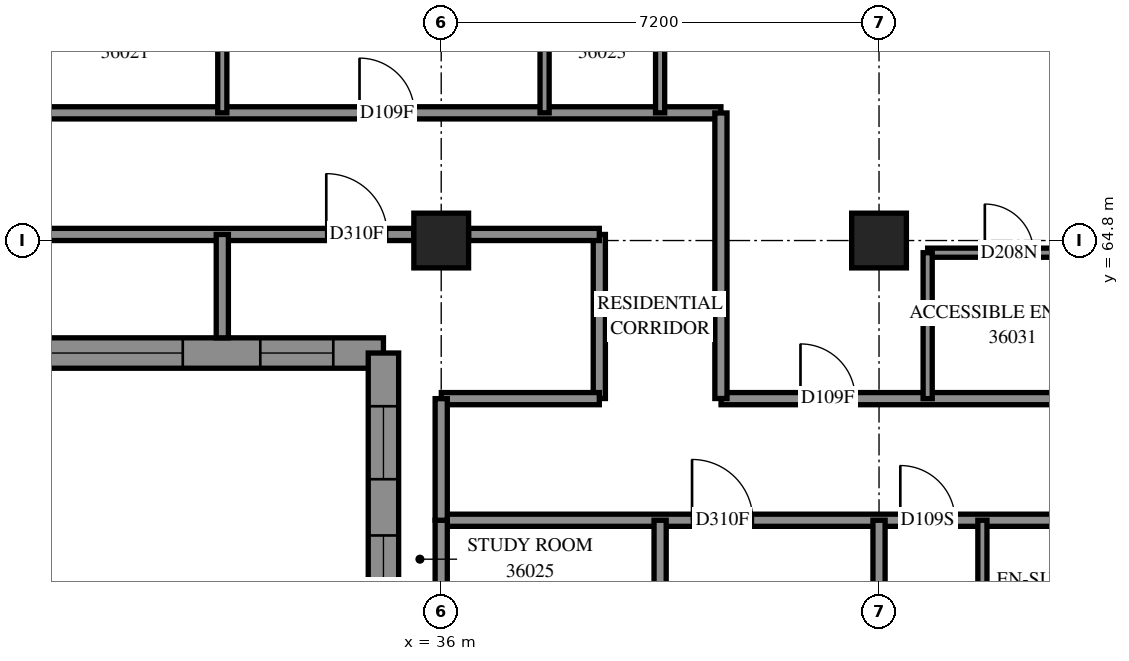
"""IFC4 building model, lengths in metres.
Left out: names, types, materials, properties, quantities, classifications, styles, units other than length and angle.
Written with IfcOpenShell. Run it as: python <this file> out.ifc"""

import sys

from ifc_helpers import new_model, si_unit, direction, frame, frame_2d, origin, origin_2d, place, context, subcontext, project, spatial, polyline, rectangle, outline, extrude, element, fill, save


model = new_model("IFC4")
c1 = context("Model", 3, precision=1e-05, world=origin(), true_north=direction((0.0, 1.0)))
c2 = subcontext(c1, "Body", "Model", "MODEL_VIEW")
j1 = project(units=[si_unit("LENGTHUNIT", "METRE"), si_unit("PLANEANGLEUNIT", "RADIAN")], contexts=[c1])
p1 = place(None, origin())
s1 = spatial("IfcSite", under=j1, at=p1, CompositionType="ELEMENT")
p2 = place(p1, origin())
s2 = spatial("IfcBuilding", under=s1, at=p2, CompositionType="ELEMENT")
p3 = place(p2, frame((0.0, 0.0, 135.4)))
s3 = spatial("IfcBuildingStorey", under=s2, at=p3, CompositionType="ELEMENT", Elevation=135.4)
for number, where, z_axis, x_axis in (
    (1, (36.0, 64.8, 0.0), (0.0, 0.0, 1.0), (1.0, 0.0, 0.0)),
    (2, (43.2, 64.8, 0.0), (0.0, 0.0, 1.0), (1.0, 0.0, 0.0)),
):
    element("IfcColumn", number, at=place(p3, frame(where, z_axis=z_axis, x_axis=x_axis)), inside=s3, PredefinedType="COLUMN", context=c2, shape_type="SweptSolid", body=[
        extrude(rectangle(XDim=0.9, YDim=0.9, at=origin_2d()), origin(), (0.0, 0.0, 1.0), 3.1),
    ])
p4 = place(p3, frame((19.75, 62.95, 0.0), z_axis=(0.0, 0.0, 1.0), x_axis=(1.0, 0.0, 0.0)))
e3 = element("IfcWall", 3, at=p4, inside=s3, PredefinedType="SOLIDWALL", context=c2, shape_type="SweptSolid", body=[
    extrude(outline(polyline([(-0.25, -0.25), (15.05, -0.25), (15.55, 0.25), (0.25, 0.25), (-0.25, -0.25)])), origin(), (0.0, 0.0, 1.0), 3.1),
])
p5 = place(p4, frame((2.25, 0.0, 0.45)))
e4 = element("IfcOpeningElement", 4, at=p5, cuts=e3, PredefinedType="OPENING", context=c2, shape_type="SweptSolid", body=[
    extrude(rectangle(XDim=2.8, YDim=2.5, at=frame_2d((1.4, 1.25))), frame((0.0, 0.26, 0.0), z_axis=(0.0, -1.0, 0.0), x_axis=(1.0, 0.0, 0.0)), (0.0, 0.0, 1.0), 0.52),
])
p6 = place(p4, frame((5.85, 0.0, 0.45)))
e5 = element("IfcOpeningElement", 5, at=p6, cuts=e3, PredefinedType="OPENING", context=c2, shape_type="SweptSolid", body=[
    extrude(rectangle(XDim=2.8, YDim=2.5, at=frame_2d((1.4, 1.25))), frame((0.0, 0.26, 0.0), z_axis=(0.0, -1.0, 0.0), x_axis=(1.0, 0.0, 0.0)), (0.0, 0.0, 1.0), 0.52),
])
p7 = place(p4, frame((9.2, 0.0, 0.45)))
e6 = element("IfcOpeningElement", 6, at=p7, cuts=e3, PredefinedType="OPENING", context=c2, shape_type="SweptSolid", body=[
    extrude(rectangle(XDim=2.8, YDim=2.5, at=frame_2d((1.4, 1.25))), frame((0.0, 0.26, 0.0), z_axis=(0.0, -1.0, 0.0), x_axis=(1.0, 0.0, 0.0)), (0.0, 0.0, 1.0), 0.52),
])
p8 = place(p4, frame((0.55, 0.0, 0.45)))
e7 = element("IfcOpeningElement", 7, at=p8, cuts=e3, PredefinedType="OPENING", context=c2, shape_type="SweptSolid", body=[
    extrude(rectangle(XDim=1.2, YDim=2.5, at=frame_2d((0.6, 1.25))), frame((0.0, 0.26, 0.0), z_axis=(0.0, -1.0, 0.0), x_axis=(1.0, 0.0, 0.0)), (0.0, 0.0, 1.0), 0.52),
])
p9 = place(p4, frame((13.275, 0.0, 0.45)))
e8 = element("IfcOpeningElement", 8, at=p9, cuts=e3, PredefinedType="OPENING", context=c2, shape_type="SweptSolid", body=[
    extrude(rectangle(XDim=1.2, YDim=2.5, at=frame_2d((0.6, 1.25))), frame((0.0, 0.26, 0.0), z_axis=(0.0, -1.0, 0.0), x_axis=(1.0, 0.0, 0.0)), (0.0, 0.0, 1.0), 0.52),
])
p10 = place(p3, frame((35.05, 62.95, 0.0), z_axis=(0.0, 0.0, 1.0), x_axis=(0.0, -1.0, 0.0)))
e9 = element("IfcWall", 9, at=p10, inside=s3, PredefinedType="SOLIDWALL", context=c2, shape_type="SweptSolid", body=[
    extrude(outline(polyline([(0.25, -0.25), (6.55, -0.25), (6.05, 0.25), (-0.25, 0.25), (0.25, -0.25)])), origin(), (0.0, 0.0, 1.0), 3.1),
])
p11 = place(p10, frame((0.875, 0.0, 0.45)))
e10 = element("IfcOpeningElement", 10, at=p11, cuts=e9, PredefinedType="OPENING", context=c2, shape_type="SweptSolid", body=[
    extrude(rectangle(XDim=1.2, YDim=2.5, at=frame_2d((0.6, 1.25))), frame((0.0, 0.26, 0.0), z_axis=(0.0, -1.0, 0.0), x_axis=(1.0, 0.0, 0.0)), (0.0, 0.0, 1.0), 0.52),
])
p12 = place(p10, frame((3.0, 0.0, 0.7)))
e11 = element("IfcOpeningElement", 11, at=p12, cuts=e9, PredefinedType="OPENING", context=c2, shape_type="SweptSolid", body=[
    extrude(rectangle(XDim=1.8, YDim=2.2, at=frame_2d((0.9, 1.1))), frame((0.0, 0.26, 0.0), z_axis=(0.0, -1.0, 0.0), x_axis=(1.0, 0.0, 0.0)), (0.0, 0.0, 1.0), 0.52),
])
p13 = place(p3, frame((21.6, 66.9, 0.0), z_axis=(0.0, 0.0, 1.0), x_axis=(1.0, 0.0, 0.0)))
e12 = element("IfcWall", 12, at=p13, inside=s3, PredefinedType="PARTITIONING", context=c2, shape_type="SweptSolid", body=[
    extrude(rectangle(XDim=19.0, YDim=0.2, at=frame_2d((9.5, 0.0))), origin(), (0.0, 0.0, 1.0), 3.1),
])
p14 = place(p13, frame((2.3, 0.0, 0.0)))
e13 = element("IfcOpeningElement", 13, at=p14, cuts=e12, PredefinedType="OPENING", context=c2, shape_type="SweptSolid", body=[
    extrude(rectangle(XDim=0.9, YDim=2.1, at=frame_2d((0.45, 1.05))), frame((0.0, 0.11, 0.0), z_axis=(0.0, -1.0, 0.0), x_axis=(1.0, 0.0, 0.0)), (0.0, 0.0, 1.0), 0.22),
])
p15 = place(p13, frame((5.957, 0.0, 0.0)))
e14 = element("IfcOpeningElement", 14, at=p15, cuts=e12, PredefinedType="OPENING", context=c2, shape_type="SweptSolid", body=[
    extrude(rectangle(XDim=0.9, YDim=2.1, at=frame_2d((0.45, 1.05))), frame((0.0, 0.11, 0.0), z_axis=(0.0, -1.0, 0.0), x_axis=(1.0, 0.0, 0.0)), (0.0, 0.0, 1.0), 0.22),
])
p16 = place(p13, frame((13.057, 0.0, 0.0)))
e15 = element("IfcOpeningElement", 15, at=p16, cuts=e12, PredefinedType="OPENING", context=c2, shape_type="SweptSolid", body=[
    extrude(rectangle(XDim=0.9, YDim=2.1, at=frame_2d((0.45, 1.05))), frame((0.0, 0.11, 0.0), z_axis=(0.0, -1.0, 0.0), x_axis=(1.0, 0.0, 0.0)), (0.0, 0.0, 1.0), 0.22),
])
p17 = place(p3, frame((36.0, 60.2, 0.0), z_axis=(0.0, 0.0, 1.0), x_axis=(1.0, 0.0, 0.0)))
e16 = element("IfcWall", 16, at=p17, inside=s3, PredefinedType="PARTITIONING", context=c2, shape_type="SweptSolid", body=[
    extrude(rectangle(XDim=17.0, YDim=0.2, at=frame_2d((8.5, 0.0))), origin(), (0.0, 0.0, 1.0), 3.1),
])
p18 = place(p17, frame((15.805, 0.0, 0.0)))
e17 = element("IfcOpeningElement", 17, at=p18, cuts=e16, PredefinedType="OPENING", context=c2, shape_type="SweptSolid", body=[
    extrude(rectangle(XDim=1.0, YDim=2.1, at=frame_2d((0.5, 1.05))), frame((0.0, 0.11, 0.0), z_axis=(0.0, -1.0, 0.0), x_axis=(1.0, 0.0, 0.0)), (0.0, 0.0, 1.0), 0.22),
])
p19 = place(p17, frame((4.125, 0.0, 0.0)))
e18 = element("IfcOpeningElement", 18, at=p19, cuts=e16, PredefinedType="OPENING", context=c2, shape_type="SweptSolid", body=[
    extrude(rectangle(XDim=1.0, YDim=2.1, at=frame_2d((0.5, 1.05))), frame((0.0, 0.11, 0.0), z_axis=(0.0, -1.0, 0.0), x_axis=(1.0, 0.0, 0.0)), (0.0, 0.0, 1.0), 0.22),
])
p20 = place(p17, frame((7.55, 0.0, 0.0)))
e19 = element("IfcOpeningElement", 19, at=p20, cuts=e16, PredefinedType="OPENING", context=c2, shape_type="SweptSolid", body=[
    extrude(rectangle(XDim=0.9, YDim=2.1, at=frame_2d((0.45, 1.05))), frame((0.0, 0.11, 0.0), z_axis=(0.0, -1.0, 0.0), x_axis=(1.0, 0.0, 0.0)), (0.0, 0.0, 1.0), 0.22),
])
p21 = place(p17, frame((11.635, 0.0, 0.0)))
e20 = element("IfcOpeningElement", 20, at=p21, cuts=e16, PredefinedType="OPENING", context=c2, shape_type="SweptSolid", body=[
    extrude(rectangle(XDim=1.0, YDim=2.1, at=frame_2d((0.5, 1.05))), frame((0.0, 0.11, 0.0), z_axis=(0.0, -1.0, 0.0), x_axis=(1.0, 0.0, 0.0)), (0.0, 0.0, 1.0), 0.22),
])
p22 = place(p3, frame((40.602, 62.2, 0.0), z_axis=(0.0, 0.0, 1.0), x_axis=(1.0, 0.0, 0.0)))
e21 = element("IfcWall", 21, at=p22, inside=s3, PredefinedType="PARTITIONING", context=c2, shape_type="SweptSolid", body=[
    extrude(rectangle(XDim=14.298, YDim=0.2, at=frame_2d((7.149, 0.0))), origin(), (0.0, 0.0, 1.0), 3.1),
])
p23 = place(p22, frame((1.306, 0.0, 0.0)))
e22 = element("IfcOpeningElement", 22, at=p23, cuts=e21, PredefinedType="OPENING", context=c2, shape_type="SweptSolid", body=[
    extrude(rectangle(XDim=0.9, YDim=2.1, at=frame_2d((0.45, 1.05))), frame((0.0, 0.11, 0.0), z_axis=(0.0, -1.0, 0.0), x_axis=(1.0, 0.0, 0.0)), (0.0, 0.0, 1.0), 0.22),
])
p24 = place(p22, frame((8.455, 0.0, 0.0)))
e23 = element("IfcOpeningElement", 23, at=p24, cuts=e21, PredefinedType="OPENING", context=c2, shape_type="SweptSolid", body=[
    extrude(rectangle(XDim=0.9, YDim=2.1, at=frame_2d((0.45, 1.05))), frame((0.0, 0.11, 0.0), z_axis=(0.0, -1.0, 0.0), x_axis=(1.0, 0.0, 0.0)), (0.0, 0.0, 1.0), 0.22),
])
p25 = place(p3, frame((29.25, 64.9, 0.0), z_axis=(0.0, 0.0, 1.0), x_axis=(1.0, 0.0, 0.0)))
e24 = element("IfcWall", 24, at=p25, inside=s3, PredefinedType="PARTITIONING", context=c2, shape_type="SweptSolid", body=[
    extrude(rectangle(XDim=6.3, YDim=0.2, at=frame_2d((3.15, 0.0))), origin(), (0.0, 0.0, 1.0), 2.6),
])
p26 = place(p25, frame((4.86, 0.0, 0.0)))
e25 = element("IfcOpeningElement", 25, at=p26, cuts=e24, PredefinedType="OPENING", context=c2, shape_type="SweptSolid", body=[
    extrude(rectangle(XDim=1.0, YDim=2.1, at=frame_2d((0.5, 1.05))), frame((0.0, 0.11, 0.0), z_axis=(0.0, -1.0, 0.0), x_axis=(1.0, 0.0, 0.0)), (0.0, 0.0, 1.0), 0.22),
])
p27 = place(p3, frame((40.6, 62.202, 0.0), z_axis=(0.0, 0.0, 1.0), x_axis=(0.0, 1.0, 0.0)))
e26 = element("IfcWall", 26, at=p27, inside=s3, PredefinedType="PARTITIONING", context=c2, shape_type="SweptSolid", body=[
    extrude(rectangle(XDim=4.696, YDim=0.2, at=frame_2d((2.348, 0.0))), origin(), (0.0, 0.0, 1.0), 3.1),
])
p28 = place(p3, frame((39.6, 56.9, 0.0), z_axis=(0.0, 0.0, 1.0), x_axis=(0.0, 1.0, 0.0)))
e27 = element("IfcWall", 27, at=p28, inside=s3, PredefinedType="PARTITIONING", context=c2, shape_type="SweptSolid", body=[
    extrude(rectangle(XDim=3.3, YDim=0.2, at=frame_2d((1.65, 0.0))), origin(), (0.0, 0.0, 1.0), 3.1),
])
p29 = place(p3, frame((44.0, 64.6, 0.0), z_axis=(0.0, 0.0, 1.0), x_axis=(1.0, 0.0, 0.0)))
e28 = element("IfcWall", 28, at=p29, inside=s3, PredefinedType="PARTITIONING", context=c2, shape_type="SweptSolid", body=[
    extrude(rectangle(XDim=2.8, YDim=0.15, at=frame_2d((1.4, 0.0))), origin(), (0.0, 0.0, 1.0), 3.1),
])
p30 = place(p29, frame((0.94, 0.0, 0.0)))
e29 = element("IfcOpeningElement", 29, at=p30, cuts=e28, PredefinedType="OPENING", context=c2, shape_type="SweptSolid", body=[
    extrude(rectangle(XDim=0.8, YDim=2.1, at=frame_2d((0.4, 1.05))), frame((0.0, 0.085, 0.0), z_axis=(0.0, -1.0, 0.0), x_axis=(1.0, 0.0, 0.0)), (0.0, 0.0, 1.0), 0.17),
])
p31 = place(p3, frame((38.6, 62.202, 0.0), z_axis=(0.0, 0.0, 1.0), x_axis=(0.0, 1.0, 0.0)))
e30 = element("IfcWall", 30, at=p31, inside=s3, PredefinedType="PARTITIONING", context=c2, shape_type="SweptSolid", body=[
    extrude(rectangle(XDim=2.698, YDim=0.2, at=frame_2d((1.349, 0.0))), origin(), (0.0, 0.0, 1.0), 3.1),
])
p32 = place(p3, frame((36.002, 62.2, 0.0), z_axis=(0.0, 0.0, 1.0), x_axis=(1.0, 0.0, 0.0)))
e31 = element("IfcWall", 31, at=p32, inside=s3, PredefinedType="PARTITIONING", context=c2, shape_type="SweptSolid", body=[
    extrude(rectangle(XDim=2.598, YDim=0.2, at=frame_2d((1.299, 0.0))), origin(), (0.0, 0.0, 1.0), 3.1),
])
for number, where, z_axis, x_axis in (
    (32, (44.9, 57.8, 0.0), (0.0, 0.0, 1.0), (0.0, 1.0, 0.0)),
    (33, (32.4, 66.9, 0.0), (0.0, 0.0, 1.0), (0.0, 1.0, 0.0)),
    (34, (37.7, 66.9, 0.0), (0.0, 0.0, 1.0), (0.0, 1.0, 0.0)),
    (35, (39.6, 66.9, 0.0), (0.0, 0.0, 1.0), (0.0, 1.0, 0.0)),
    (36, (44.0, 62.2, 0.0), (0.0, 0.0, 1.0), (0.0, 1.0, 0.0)),
):
    element("IfcWall", number, at=place(p3, frame(where, z_axis=z_axis, x_axis=x_axis)), inside=s3, PredefinedType="PARTITIONING", context=c2, shape_type="SweptSolid", body=[
        extrude(rectangle(XDim=2.4, YDim=0.15, at=frame_2d((1.2, 0.0))), origin(), (0.0, 0.0, 1.0), 3.1),
    ])
p33 = place(p3, frame((36.0, 58.05, 0.0), z_axis=(0.0, 0.0, 1.0), x_axis=(0.0, 1.0, 0.0)))
e37 = element("IfcWall", 37, at=p33, inside=s3, PredefinedType="PARTITIONING", context=c2, shape_type="SweptSolid", body=[
    extrude(rectangle(XDim=2.15, YDim=0.2, at=frame_2d((1.075, 0.0))), origin(), (0.0, 0.0, 1.0), 2.6),
])
for number, where, z_axis, x_axis in (
    (38, (43.2, 58.05, 0.0), (0.0, 0.0, 1.0), (0.0, 1.0, 0.0)),
    (39, (36.45, 64.9, 0.0), (0.0, 0.0, 1.0), (1.0, 0.0, 0.0)),
):
    element("IfcWall", number, at=place(p3, frame(where, z_axis=z_axis, x_axis=x_axis)), inside=s3, PredefinedType="PARTITIONING", context=c2, shape_type="SweptSolid", body=[
        extrude(rectangle(XDim=2.15, YDim=0.2, at=frame_2d((1.075, 0.0))), origin(), (0.0, 0.0, 1.0), 3.1),
    ])
p34 = place(p3, frame((36.0, 60.2, 0.0), z_axis=(0.0, 0.0, 1.0), x_axis=(0.0, 1.0, 0.0)))
e40 = element("IfcWall", 40, at=p34, inside=s3, PredefinedType="PARTITIONING", context=c2, shape_type="SweptSolid", body=[
    extrude(rectangle(XDim=2.0, YDim=0.2, at=frame_2d((1.0, 0.0))), origin(), (0.0, 0.0, 1.0), 2.6),
])
p35 = place(p3, frame((32.4, 63.2, 0.0), z_axis=(0.0, 0.0, 1.0), x_axis=(0.0, 1.0, 0.0)))
e41 = element("IfcWall", 41, at=p35, inside=s3, PredefinedType="PARTITIONING", context=c2, shape_type="SweptSolid", body=[
    extrude(rectangle(XDim=1.7, YDim=0.2, at=frame_2d((0.85, 0.0))), origin(), (0.0, 0.0, 1.0), 3.1),
])
p36 = place(p7, origin())
e42 = element("IfcWindow", 42, at=p36, inside=s3, PartitioningType="SINGLE_PANEL", PredefinedType="WINDOW", context=c2, shape_type="SweptSolid", body=[
    extrude(rectangle(XDim=2.8, YDim=2.5, at=frame_2d((1.4, 1.25))), frame((0.0, 0.18, 0.0), z_axis=(0.0, -1.0, 0.0), x_axis=(1.0, 0.0, 0.0)), (0.0, 0.0, 1.0), 0.06),
])
fill(e6, e42)
p37 = place(p9, origin())
e43 = element("IfcWindow", 43, at=p37, inside=s3, PartitioningType="SINGLE_PANEL", PredefinedType="WINDOW", context=c2, shape_type="SweptSolid", body=[
    extrude(rectangle(XDim=1.2, YDim=2.5, at=frame_2d((0.6, 1.25))), frame((0.0, 0.18, 0.0), z_axis=(0.0, -1.0, 0.0), x_axis=(1.0, 0.0, 0.0)), (0.0, 0.0, 1.0), 0.06),
])
fill(e8, e43)
p38 = place(p11, origin())
e44 = element("IfcWindow", 44, at=p38, inside=s3, PartitioningType="SINGLE_PANEL", PredefinedType="WINDOW", context=c2, shape_type="SweptSolid", body=[
    extrude(rectangle(XDim=1.2, YDim=2.5, at=frame_2d((0.6, 1.25))), frame((0.0, 0.18, 0.0), z_axis=(0.0, -1.0, 0.0), x_axis=(1.0, 0.0, 0.0)), (0.0, 0.0, 1.0), 0.06),
])
fill(e10, e44)
p39 = place(p16, origin())
e45 = element("IfcDoor", 45, at=p39, inside=s3, OperationType="SINGLE_SWING_LEFT", PredefinedType="DOOR", context=c2, shape_type="SweptSolid", body=[
    extrude(rectangle(XDim=0.9, YDim=2.1, at=frame_2d((0.45, 1.05))), frame((0.0, 0.025, 0.0), z_axis=(0.0, -1.0, 0.0), x_axis=(1.0, 0.0, 0.0)), (0.0, 0.0, 1.0), 0.05),
])
fill(e15, e45)
p40 = place(p26, origin())
e46 = element("IfcDoor", 46, at=p40, inside=s3, OperationType="SINGLE_SWING_RIGHT", PredefinedType="DOOR", context=c2, shape_type="SweptSolid", body=[
    extrude(rectangle(XDim=1.0, YDim=2.1, at=frame_2d((0.5, 1.05))), frame((0.0, 0.025, 0.0), z_axis=(0.0, -1.0, 0.0), x_axis=(1.0, 0.0, 0.0)), (0.0, 0.0, 1.0), 0.05),
])
fill(e25, e46)
p41 = place(p19, origin())
e47 = element("IfcDoor", 47, at=p41, inside=s3, OperationType="SINGLE_SWING_RIGHT", PredefinedType="DOOR", context=c2, shape_type="SweptSolid", body=[
    extrude(rectangle(XDim=1.0, YDim=2.1, at=frame_2d((0.5, 1.05))), frame((0.0, 0.025, 0.0), z_axis=(0.0, -1.0, 0.0), x_axis=(1.0, 0.0, 0.0)), (0.0, 0.0, 1.0), 0.05),
])
fill(e18, e47)
p42 = place(p20, origin())
e48 = element("IfcDoor", 48, at=p42, inside=s3, OperationType="SINGLE_SWING_LEFT", PredefinedType="DOOR", context=c2, shape_type="SweptSolid", body=[
    extrude(rectangle(XDim=0.9, YDim=2.1, at=frame_2d((0.45, 1.05))), frame((0.0, 0.025, 0.0), z_axis=(0.0, -1.0, 0.0), x_axis=(1.0, 0.0, 0.0)), (0.0, 0.0, 1.0), 0.05),
])
fill(e19, e48)
p43 = place(p23, origin())
e49 = element("IfcDoor", 49, at=p43, inside=s3, OperationType="SINGLE_SWING_LEFT", PredefinedType="DOOR", context=c2, shape_type="SweptSolid", body=[
    extrude(rectangle(XDim=0.9, YDim=2.1, at=frame_2d((0.45, 1.05))), frame((0.0, 0.025, 0.0), z_axis=(0.0, -1.0, 0.0), x_axis=(1.0, 0.0, 0.0)), (0.0, 0.0, 1.0), 0.05),
])
fill(e22, e49)
p44 = place(p30, origin())
e50 = element("IfcDoor", 50, at=p44, inside=s3, OperationType="SINGLE_SWING_RIGHT", PredefinedType="DOOR", context=c2, shape_type="SweptSolid", body=[
    extrude(rectangle(XDim=0.8, YDim=2.1, at=frame_2d((0.4, 1.05))), frame((0.0, 0.025, 0.0), z_axis=(0.0, -1.0, 0.0), x_axis=(1.0, 0.0, 0.0)), (0.0, 0.0, 1.0), 0.05),
])
fill(e29, e50)
p45 = place(p12, origin())
e51 = element("IfcWindow", 51, at=p45, inside=s3, PartitioningType="SINGLE_PANEL", PredefinedType="WINDOW", context=c2, shape_type="SweptSolid", body=[
    extrude(rectangle(XDim=1.8, YDim=2.2, at=frame_2d((0.9, 1.1))), frame((0.0, 0.18, 0.0), z_axis=(0.0, -1.0, 0.0), x_axis=(1.0, 0.0, 0.0)), (0.0, 0.0, 1.0), 0.06),
])
fill(e11, e51)
save(model, sys.argv[1])
